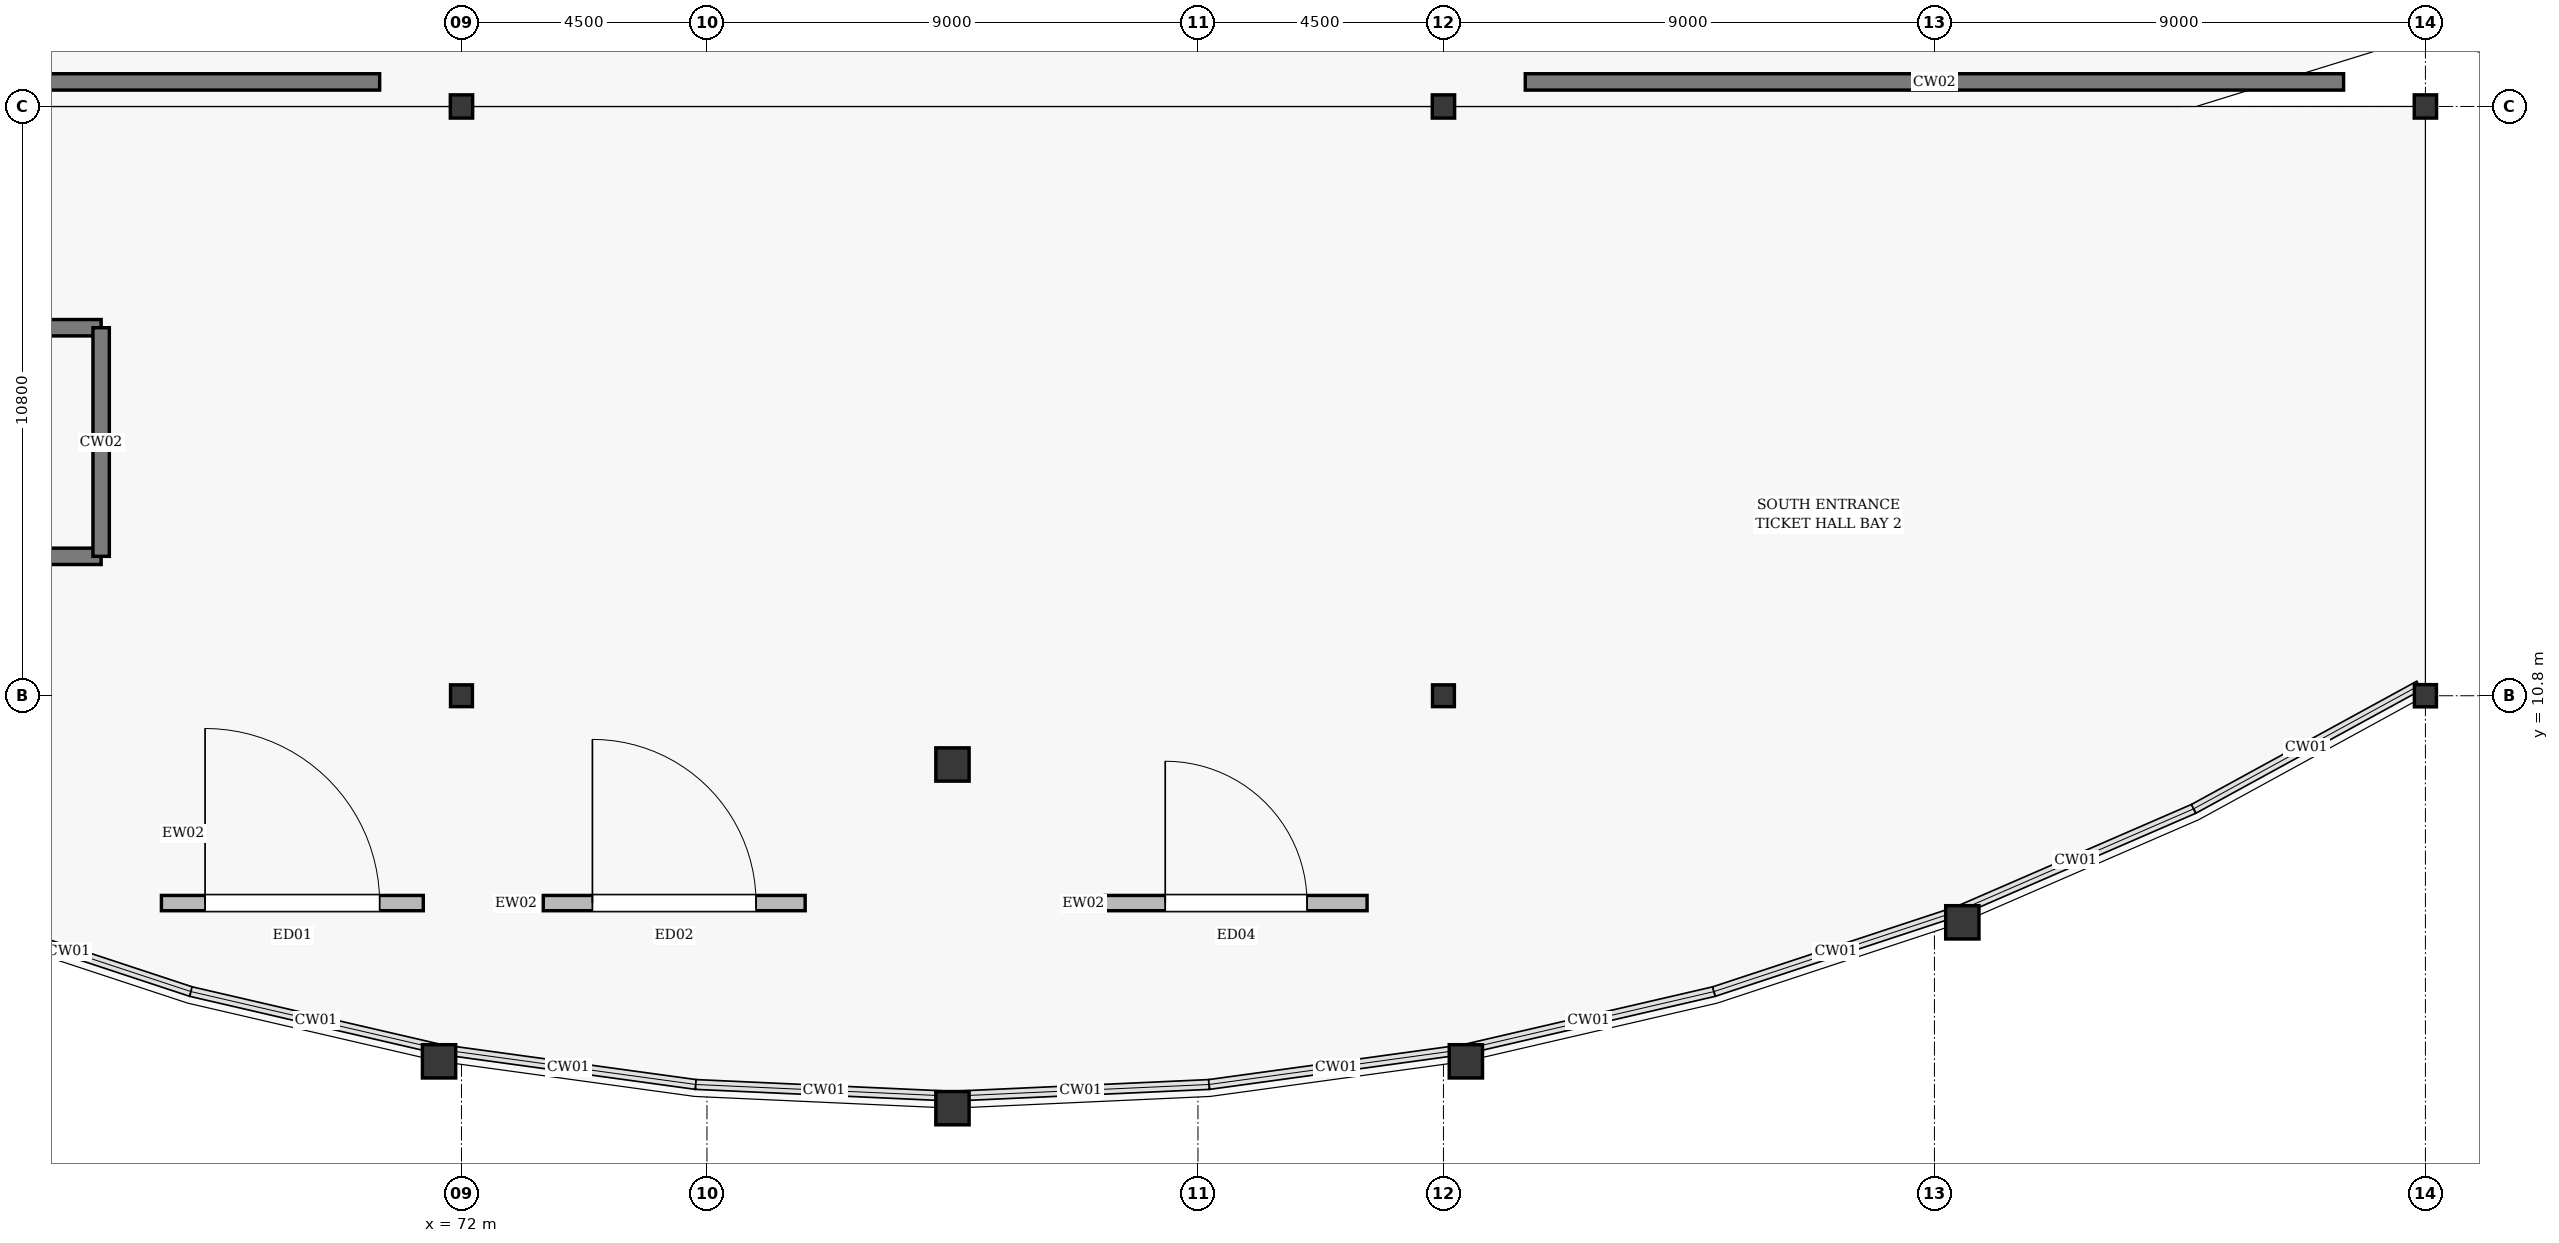
"""IFC4 building model, lengths in metres.
Left out: names, types, materials, properties, quantities, classifications, styles, units other than length and angle.
Written with IfcOpenShell. Run it as: python <this file> out.ifc"""

import sys

from ifc_helpers import new_model, si_unit, direction, frame, frame_2d, origin, origin_2d, place, context, subcontext, project, spatial, rectangle, hollow_circle, i_section, extrude, element, fill, save


model = new_model("IFC4")
c1 = context("Model", 3, precision=1e-05, world=origin(), true_north=direction((0.0, 1.0)))
c2 = subcontext(c1, "Body", "Model", "MODEL_VIEW")
j1 = project(units=[si_unit("LENGTHUNIT", "METRE"), si_unit("PLANEANGLEUNIT", "RADIAN")], contexts=[c1])
p1 = place(None, origin())
s1 = spatial("IfcSite", under=j1, at=p1, CompositionType="ELEMENT")
p2 = place(p1, origin())
s2 = spatial("IfcBuilding", under=s1, at=p2, CompositionType="ELEMENT")
p3 = place(p2, origin())
s3 = spatial("IfcBuildingStorey", under=s2, at=p3, CompositionType="ELEMENT", Elevation=0.0)
p4 = place(p3, frame((72.0, 10.8, 0.0), z_axis=(0.0, 0.0, 1.0), x_axis=(1.0, 0.0, 0.0)))
e1 = element("IfcColumn", 1, at=p4, inside=s3, PredefinedType="COLUMN", context=c2, shape_type="SweptSolid", body=[
    extrude(i_section(OverallWidth=0.401, OverallDepth=0.399, WebThickness=0.019, FlangeThickness=0.029, at=origin_2d()), origin(), (0.0, 0.0, 1.0), 6.6),
])
p5 = place(p3, frame((72.0, 21.6, 0.0), z_axis=(0.0, 0.0, 1.0), x_axis=(1.0, 0.0, 0.0)))
e2 = element("IfcColumn", 2, at=p5, inside=s3, PredefinedType="COLUMN", context=c2, shape_type="SweptSolid", body=[
    extrude(i_section(OverallWidth=0.409, OverallDepth=0.425, WebThickness=0.025, FlangeThickness=0.039, at=origin_2d()), origin(), (0.0, 0.0, 1.0), 6.6),
])
p6 = place(p3, frame((90.0, 10.8, 0.0), z_axis=(0.0, 0.0, 1.0), x_axis=(1.0, 0.0, 0.0)))
e3 = element("IfcColumn", 3, at=p6, inside=s3, PredefinedType="COLUMN", context=c2, shape_type="SweptSolid", body=[
    extrude(i_section(OverallWidth=0.401, OverallDepth=0.399, WebThickness=0.019, FlangeThickness=0.029, at=origin_2d()), origin(), (0.0, 0.0, 1.0), 6.6),
])
p7 = place(p3, frame((90.0, 21.6, 0.0), z_axis=(0.0, 0.0, 1.0), x_axis=(1.0, 0.0, 0.0)))
e4 = element("IfcColumn", 4, at=p7, inside=s3, PredefinedType="COLUMN", context=c2, shape_type="SweptSolid", body=[
    extrude(i_section(OverallWidth=0.409, OverallDepth=0.425, WebThickness=0.025, FlangeThickness=0.039, at=origin_2d()), origin(), (0.0, 0.0, 1.0), 6.6),
])
p8 = place(p3, frame((108.0, 10.8, 0.0), z_axis=(0.0, 0.0, 1.0), x_axis=(1.0, 0.0, 0.0)))
e5 = element("IfcColumn", 5, at=p8, inside=s3, PredefinedType="COLUMN", context=c2, shape_type="SweptSolid", body=[
    extrude(i_section(OverallWidth=0.404, OverallDepth=0.407, WebThickness=0.021, FlangeThickness=0.032, at=origin_2d()), origin(), (0.0, 0.0, 1.0), 6.6),
])
p9 = place(p3, frame((108.0, 21.6, 0.0), z_axis=(0.0, 0.0, 1.0), x_axis=(1.0, 0.0, 0.0)))
e6 = element("IfcColumn", 6, at=p9, inside=s3, PredefinedType="COLUMN", context=c2, shape_type="SweptSolid", body=[
    extrude(i_section(OverallWidth=0.409, OverallDepth=0.425, WebThickness=0.025, FlangeThickness=0.039, at=origin_2d()), origin(), (0.0, 0.0, 1.0), 6.6),
])
for number, where, z_axis, x_axis in (
    (7, (81.0, 9.54, 0.0), (0.0, 0.0, 1.0), (1.0, 0.0, 0.0)),
    (8, (71.589, 4.1, 0.0), (0.0, 0.0, 1.0), (1.0, 0.0, 0.0)),
    (9, (81.0, 3.241, 0.0), (0.0, 0.0, 1.0), (1.0, 0.0, 0.0)),
    (10, (90.411, 4.1, 0.0), (0.0, 0.0, 1.0), (1.0, 0.0, 0.0)),
    (11, (99.511, 6.647, 0.0), (0.0, 0.0, 1.0), (1.0, 0.0, 0.0)),
):
    element("IfcColumn", number, at=place(p3, frame(where, z_axis=z_axis, x_axis=x_axis)), inside=s3, PredefinedType="COLUMN", context=c2, shape_type="SweptSolid", body=[
        extrude(hollow_circle(Radius=0.305, WallThickness=0.02, at=origin_2d()), origin(), (0.0, 0.0, 1.0), 6.6),
    ])
for number, where, z_axis, x_axis in (
    (12, (55.5, 22.05, 0.0), (0.0, 0.0, 1.0), (1.0, 0.0, 0.0)),
    (13, (91.5, 22.05, 0.0), (0.0, 0.0, 1.0), (1.0, 0.0, 0.0)),
):
    element("IfcWall", number, at=place(p3, frame(where, z_axis=z_axis, x_axis=x_axis)), inside=s3, PredefinedType="SOLIDWALL", context=c2, shape_type="SweptSolid", body=[
        extrude(rectangle(XDim=15.0, YDim=0.3, at=frame_2d((7.5, 0.0))), origin(), (0.0, 0.0, 1.0), 0.375),
    ])
p10 = place(p3, frame((66.5, 7.0, 0.0), z_axis=(0.0, 0.0, 1.0), x_axis=(1.0, 0.0, 0.0)))
e14 = element("IfcWall", 14, at=p10, inside=s3, PredefinedType="STANDARD", context=c2, shape_type="SweptSolid", body=[
    extrude(rectangle(XDim=4.8, YDim=0.28, at=frame_2d((2.4, 0.0))), origin(), (0.0, 0.0, 1.0), 4.2),
])
p11 = place(p10, frame((0.8, 0.0, 0.005)))
e15 = element("IfcOpeningElement", 15, at=p11, cuts=e14, PredefinedType="OPENING", context=c2, shape_type="SweptSolid", body=[
    extrude(rectangle(XDim=3.2, YDim=2.8, at=frame_2d((1.6, 1.4))), frame((0.0, 0.152, 0.0), z_axis=(0.0, -1.0, 0.0), x_axis=(1.0, 0.0, 0.0)), (0.0, 0.0, 1.0), 0.304),
])
p12 = place(p3, frame((73.5, 7.0, 0.0), z_axis=(0.0, 0.0, 1.0), x_axis=(1.0, 0.0, 0.0)))
e16 = element("IfcWall", 16, at=p12, inside=s3, PredefinedType="STANDARD", context=c2, shape_type="SweptSolid", body=[
    extrude(rectangle(XDim=4.8, YDim=0.28, at=frame_2d((2.4, 0.0))), origin(), (0.0, 0.0, 1.0), 4.2),
])
p13 = place(p12, frame((0.9, 0.0, 0.005)))
e17 = element("IfcOpeningElement", 17, at=p13, cuts=e16, PredefinedType="OPENING", context=c2, shape_type="SweptSolid", body=[
    extrude(rectangle(XDim=3.0, YDim=2.8, at=frame_2d((1.5, 1.4))), frame((0.0, 0.152, 0.0), z_axis=(0.0, -1.0, 0.0), x_axis=(1.0, 0.0, 0.0)), (0.0, 0.0, 1.0), 0.304),
])
p14 = place(p3, frame((83.8, 7.0, 0.0), z_axis=(0.0, 0.0, 1.0), x_axis=(1.0, 0.0, 0.0)))
e18 = element("IfcWall", 18, at=p14, inside=s3, PredefinedType="STANDARD", context=c2, shape_type="SweptSolid", body=[
    extrude(rectangle(XDim=4.8, YDim=0.28, at=frame_2d((2.4, 0.0))), origin(), (0.0, 0.0, 1.0), 4.2),
])
p15 = place(p14, frame((1.1, 0.0, 0.005)))
e19 = element("IfcOpeningElement", 19, at=p15, cuts=e18, PredefinedType="OPENING", context=c2, shape_type="SweptSolid", body=[
    extrude(rectangle(XDim=2.6, YDim=2.6, at=frame_2d((1.3, 1.3))), frame((0.0, 0.152, 0.0), z_axis=(0.0, -1.0, 0.0), x_axis=(1.0, 0.0, 0.0)), (0.0, 0.0, 1.0), 0.304),
])
p16 = place(p3, frame((55.355, 13.355, 0.0), z_axis=(0.0, 0.0, 1.0), x_axis=(1.0, 0.0, 0.0)))
e20 = element("IfcWall", 20, at=p16, inside=s3, PredefinedType="SOLIDWALL", context=c2, shape_type="SweptSolid", body=[
    extrude(rectangle(XDim=10.04, YDim=0.3, at=frame_2d((5.02, 0.0))), origin(), (0.0, 0.0, 1.0), 6.6),
])
p17 = place(p3, frame((55.355, 17.545, 0.0), z_axis=(0.0, 0.0, 1.0), x_axis=(1.0, 0.0, 0.0)))
e21 = element("IfcWall", 21, at=p17, inside=s3, PredefinedType="SOLIDWALL", context=c2, shape_type="SweptSolid", body=[
    extrude(rectangle(XDim=10.04, YDim=0.3, at=frame_2d((5.02, 0.0))), origin(), (0.0, 0.0, 1.0), 6.6),
])
p18 = place(p17, frame((0.35, 0.0, 0.005)))
e22 = element("IfcOpeningElement", 22, at=p18, cuts=e21, PredefinedType="OPENING", context=c2, shape_type="SweptSolid", body=[
    extrude(rectangle(XDim=2.15, YDim=2.2, at=frame_2d((1.075, 1.1))), frame((0.0, 0.162, 0.0), z_axis=(0.0, -1.0, 0.0), x_axis=(1.0, 0.0, 0.0)), (0.0, 0.0, 1.0), 0.324),
])
p19 = place(p3, frame((65.395, 13.355, 0.0), z_axis=(0.0, 0.0, 1.0), x_axis=(0.0, 1.0, 0.0)))
e23 = element("IfcWall", 23, at=p19, inside=s3, PredefinedType="SOLIDWALL", context=c2, shape_type="SweptSolid", body=[
    extrude(rectangle(XDim=4.19, YDim=0.3, at=frame_2d((2.095, 0.0))), origin(), (0.0, 0.0, 1.0), 6.6),
])
p20 = place(p11, origin())
e24 = element("IfcDoor", 24, at=p20, inside=s3, OperationType="DOUBLE_DOOR_SINGLE_SWING", PredefinedType="DOOR", context=c2, shape_type="SweptSolid", body=[
    extrude(rectangle(XDim=3.2, YDim=2.8, at=frame_2d((1.6, 1.4))), frame((0.0, 0.025, 0.0), z_axis=(0.0, -1.0, 0.0), x_axis=(1.0, 0.0, 0.0)), (0.0, 0.0, 1.0), 0.05),
])
fill(e15, e24)
p21 = place(p13, origin())
e25 = element("IfcDoor", 25, at=p21, inside=s3, OperationType="DOUBLE_DOOR_SINGLE_SWING", PredefinedType="DOOR", context=c2, shape_type="SweptSolid", body=[
    extrude(rectangle(XDim=3.0, YDim=2.8, at=frame_2d((1.5, 1.4))), frame((0.0, 0.025, 0.0), z_axis=(0.0, -1.0, 0.0), x_axis=(1.0, 0.0, 0.0)), (0.0, 0.0, 1.0), 0.05),
])
fill(e17, e25)
p22 = place(p15, origin())
e26 = element("IfcDoor", 26, at=p22, inside=s3, OperationType="DOUBLE_DOOR_SINGLE_SWING", PredefinedType="DOOR", context=c2, shape_type="SweptSolid", body=[
    extrude(rectangle(XDim=2.6, YDim=2.6, at=frame_2d((1.3, 1.3))), frame((0.0, 0.025, 0.0), z_axis=(0.0, -1.0, 0.0), x_axis=(1.0, 0.0, 0.0)), (0.0, 0.0, 1.0), 0.05),
])
fill(e19, e26)
save(model, sys.argv[1])
